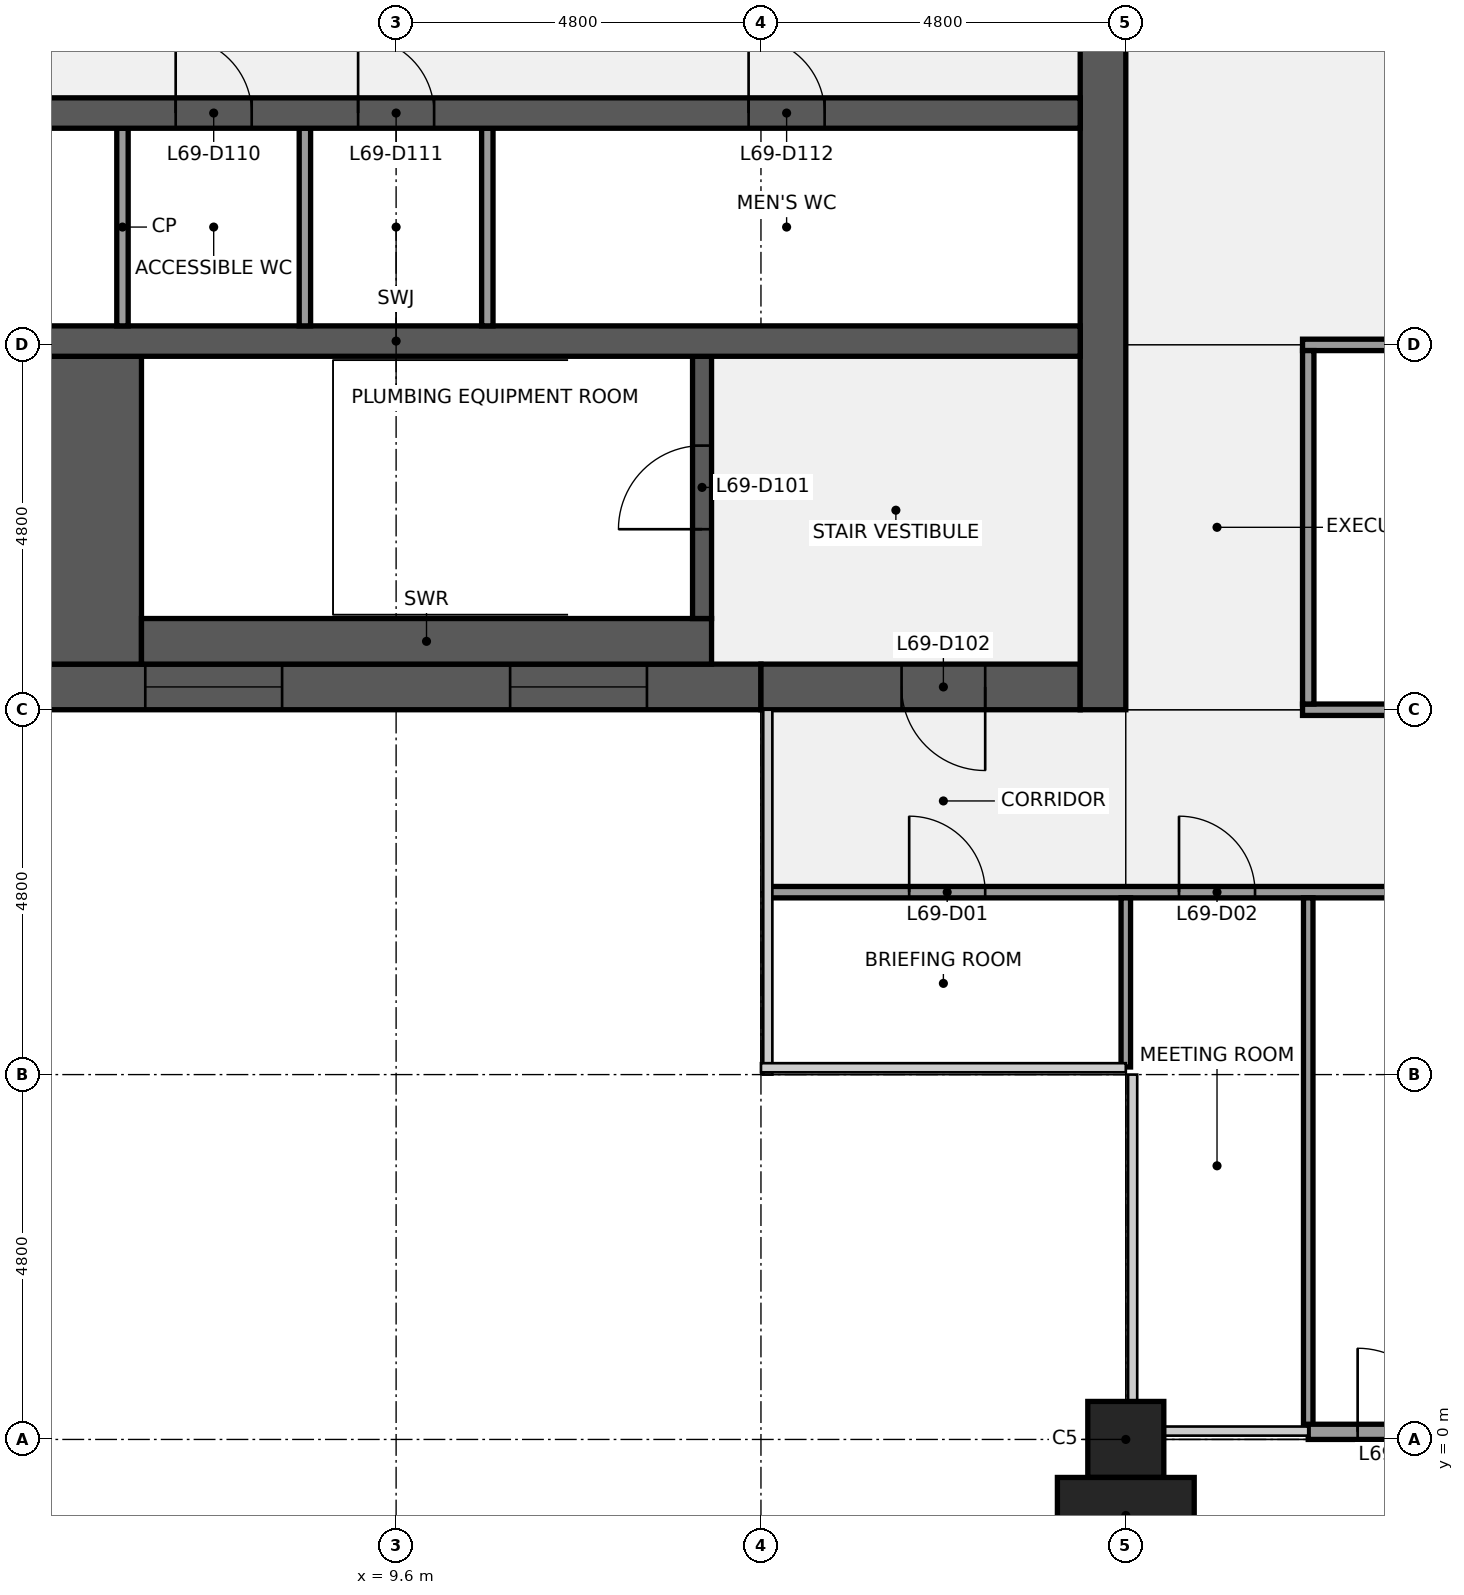
"""IFC4 building model, lengths in metres.
Left out: names, types, materials, properties, quantities, classifications, styles, units other than length and angle.
Written with IfcOpenShell. Run it as: python <this file> out.ifc"""

import sys

from ifc_helpers import new_model, si_unit, direction, frame, frame_2d, origin, origin_2d, place, context, subcontext, project, spatial, rectangle, extrude, element, fill, save


model = new_model("IFC4")
c1 = context("Model", 3, precision=1e-05, world=origin(), true_north=direction((0.0, 1.0)))
c2 = subcontext(c1, "Body", "Model", "MODEL_VIEW")
j1 = project(units=[si_unit("LENGTHUNIT", "METRE"), si_unit("PLANEANGLEUNIT", "RADIAN")], contexts=[c1])
p1 = place(None, origin())
s1 = spatial("IfcSite", under=j1, at=p1, CompositionType="ELEMENT")
p2 = place(p1, origin())
s2 = spatial("IfcBuilding", under=s1, at=p2, CompositionType="ELEMENT")
p3 = place(p2, frame((0.0, 0.0, 314.3)))
s3 = spatial("IfcBuildingStorey", under=s2, at=p3, CompositionType="ELEMENT", Elevation=314.3)
p4 = place(p3, frame((19.2, 0.0, 0.0), z_axis=(0.0, 0.0, 1.0), x_axis=(1.0, 0.0, 0.0)))
e1 = element("IfcColumn", 1, at=p4, inside=s3, PredefinedType="COLUMN", context=c2, shape_type="SweptSolid", body=[
    extrude(rectangle(XDim=1.0, YDim=1.0, at=origin_2d()), origin(), (0.0, 0.0, 1.0), 4.0),
])
p5 = place(p3, frame((14.4, 9.9, 0.0), z_axis=(0.0, 0.0, 1.0), x_axis=(-1.0, 0.0, 0.0)))
e2 = element("IfcWall", 2, at=p5, inside=s3, PredefinedType="SHEAR", context=c2, shape_type="SweptSolid", body=[
    extrude(rectangle(XDim=13.8, YDim=0.6, at=frame_2d((6.9, 0.0))), origin(), (0.0, 0.0, 1.0), 3.84),
])
p6 = place(p5, frame((6.3, 0.0, 0.9)))
e3 = element("IfcOpeningElement", 3, at=p6, cuts=e2, PredefinedType="OPENING", context=c2, shape_type="SweptSolid", body=[
    extrude(rectangle(XDim=1.8, YDim=1.5, at=frame_2d((0.9, 0.75))), frame((0.0, 0.31, 0.0), z_axis=(0.0, -1.0, 0.0), x_axis=(1.0, 0.0, 0.0)), (0.0, 0.0, 1.0), 0.62),
])
p7 = place(p5, frame((1.5, 0.0, 0.9)))
e4 = element("IfcOpeningElement", 4, at=p7, cuts=e2, PredefinedType="OPENING", context=c2, shape_type="SweptSolid", body=[
    extrude(rectangle(XDim=1.8, YDim=1.5, at=frame_2d((0.9, 0.75))), frame((0.0, 0.31, 0.0), z_axis=(0.0, -1.0, 0.0), x_axis=(1.0, 0.0, 0.0)), (0.0, 0.0, 1.0), 0.62),
])
p8 = place(p3, frame((18.6, 9.9, 0.0), z_axis=(0.0, 0.0, 1.0), x_axis=(-1.0, 0.0, 0.0)))
e5 = element("IfcWall", 5, at=p8, inside=s3, PredefinedType="SHEAR", context=c2, shape_type="SweptSolid", body=[
    extrude(rectangle(XDim=4.2, YDim=0.6, at=frame_2d((2.1, 0.0))), origin(), (0.0, 0.0, 1.0), 3.84),
])
p9 = place(p8, frame((1.25, 0.0, 0.0)))
e6 = element("IfcOpeningElement", 6, at=p9, cuts=e5, PredefinedType="OPENING", context=c2, shape_type="SweptSolid", body=[
    extrude(rectangle(XDim=1.1, YDim=2.1, at=frame_2d((0.55, 1.05))), frame((0.0, 0.31, 0.0), z_axis=(0.0, -1.0, 0.0), x_axis=(1.0, 0.0, 0.0)), (0.0, 0.0, 1.0), 0.62),
])
p10 = place(p3, frame((18.9, 38.4, 0.0), z_axis=(0.0, 0.0, 1.0), x_axis=(0.0, -1.0, 0.0)))
e7 = element("IfcWall", 7, at=p10, inside=s3, PredefinedType="SHEAR", context=c2, shape_type="SweptSolid", body=[
    extrude(rectangle(XDim=28.8, YDim=0.6, at=frame_2d((14.4, 0.0))), origin(), (0.0, 0.0, 1.0), 3.84),
])
p11 = place(p10, frame((18.3, 0.0, 0.0)))
e8 = element("IfcOpeningElement", 8, at=p11, cuts=e7, PredefinedType="OPENING", context=c2, shape_type="SweptSolid", body=[
    extrude(rectangle(XDim=1.8, YDim=2.1, at=frame_2d((0.9, 1.05))), frame((0.0, 0.31, 0.0), z_axis=(0.0, -1.0, 0.0), x_axis=(1.0, 0.0, 0.0)), (0.0, 0.0, 1.0), 0.62),
])
p12 = place(p10, frame((8.7, 0.0, 0.0)))
e9 = element("IfcOpeningElement", 9, at=p12, cuts=e7, PredefinedType="OPENING", context=c2, shape_type="SweptSolid", body=[
    extrude(rectangle(XDim=1.8, YDim=2.1, at=frame_2d((0.9, 1.05))), frame((0.0, 0.31, 0.0), z_axis=(0.0, -1.0, 0.0), x_axis=(1.0, 0.0, 0.0)), (0.0, 0.0, 1.0), 0.62),
])
p13 = place(p3, frame((0.6, 12.225, 0.0), z_axis=(0.0, 0.0, 1.0), x_axis=(1.0, 0.0, 0.0)))
e10 = element("IfcWall", 10, at=p13, inside=s3, PredefinedType="SHEAR", context=c2, shape_type="SweptSolid", body=[
    extrude(rectangle(XDim=5.65, YDim=4.05, at=frame_2d((2.825, 0.0))), origin(), (0.0, 0.0, 1.0), 3.84),
])
p14 = place(p3, frame((6.25, 10.5, 0.0), z_axis=(0.0, 0.0, 1.0), x_axis=(1.0, 0.0, 0.0)))
e11 = element("IfcWall", 11, at=p14, inside=s3, PredefinedType="SHEAR", context=c2, shape_type="SweptSolid", body=[
    extrude(rectangle(XDim=7.5, YDim=0.6, at=frame_2d((3.75, 0.0))), origin(), (0.0, 0.0, 1.0), 3.84),
])
p15 = place(p3, frame((13.625, 10.8, 0.0), z_axis=(0.0, 0.0, 1.0), x_axis=(0.0, 1.0, 0.0)))
e12 = element("IfcWall", 12, at=p15, inside=s3, PredefinedType="SHEAR", context=c2, shape_type="SweptSolid", body=[
    extrude(rectangle(XDim=3.45, YDim=0.25, at=frame_2d((1.725, 0.0))), origin(), (0.0, 0.0, 1.0), 3.84),
])
p16 = place(p15, frame((1.175, 0.0, 0.0)))
e13 = element("IfcOpeningElement", 13, at=p16, cuts=e12, PredefinedType="OPENING", context=c2, shape_type="SweptSolid", body=[
    extrude(rectangle(XDim=1.1, YDim=2.1, at=frame_2d((0.55, 1.05))), frame((0.0, 0.135, 0.0), z_axis=(0.0, -1.0, 0.0), x_axis=(1.0, 0.0, 0.0)), (0.0, 0.0, 1.0), 0.27),
])
p17 = place(p3, frame((0.6, 14.45, 0.0), z_axis=(0.0, 0.0, 1.0), x_axis=(1.0, 0.0, 0.0)))
e14 = element("IfcWall", 14, at=p17, inside=s3, PredefinedType="SHEAR", context=c2, shape_type="SweptSolid", body=[
    extrude(rectangle(XDim=18.0, YDim=0.4, at=frame_2d((9.0, 0.0))), origin(), (0.0, 0.0, 1.0), 3.84),
])
for number, where, z_axis, x_axis in (
    (15, (6.0, 14.65, 0.0), (0.0, 0.0, 1.0), (0.0, 1.0, 0.0)),
    (16, (8.4, 14.65, 0.0), (0.0, 0.0, 1.0), (0.0, 1.0, 0.0)),
    (17, (10.8, 14.65, 0.0), (0.0, 0.0, 1.0), (0.0, 1.0, 0.0)),
):
    element("IfcWall", number, at=place(p3, frame(where, z_axis=z_axis, x_axis=x_axis)), inside=s3, PredefinedType="PARTITIONING", context=c2, shape_type="SweptSolid", body=[
        extrude(rectangle(XDim=2.6, YDim=0.15, at=frame_2d((1.3, 0.0))), origin(), (0.0, 0.0, 1.0), 3.84),
    ])
p18 = place(p3, frame((0.6, 17.45, 0.0), z_axis=(0.0, 0.0, 1.0), x_axis=(1.0, 0.0, 0.0)))
e18 = element("IfcWall", 18, at=p18, inside=s3, PredefinedType="SHEAR", context=c2, shape_type="SweptSolid", body=[
    extrude(rectangle(XDim=18.0, YDim=0.4, at=frame_2d((9.0, 0.0))), origin(), (0.0, 0.0, 1.0), 3.84),
])
p19 = place(p18, frame((2.163, 0.0, 0.0)))
e19 = element("IfcOpeningElement", 19, at=p19, cuts=e18, PredefinedType="OPENING", context=c2, shape_type="SweptSolid", body=[
    extrude(rectangle(XDim=1.0, YDim=2.1, at=frame_2d((0.5, 1.05))), frame((0.0, 0.21, 0.0), z_axis=(0.0, -1.0, 0.0), x_axis=(1.0, 0.0, 0.0)), (0.0, 0.0, 1.0), 0.42),
])
p20 = place(p18, frame((6.1, 0.0, 0.0)))
e20 = element("IfcOpeningElement", 20, at=p20, cuts=e18, PredefinedType="OPENING", context=c2, shape_type="SweptSolid", body=[
    extrude(rectangle(XDim=1.0, YDim=2.1, at=frame_2d((0.5, 1.05))), frame((0.0, 0.21, 0.0), z_axis=(0.0, -1.0, 0.0), x_axis=(1.0, 0.0, 0.0)), (0.0, 0.0, 1.0), 0.42),
])
p21 = place(p18, frame((8.5, 0.0, 0.0)))
e21 = element("IfcOpeningElement", 21, at=p21, cuts=e18, PredefinedType="OPENING", context=c2, shape_type="SweptSolid", body=[
    extrude(rectangle(XDim=1.0, YDim=2.1, at=frame_2d((0.5, 1.05))), frame((0.0, 0.21, 0.0), z_axis=(0.0, -1.0, 0.0), x_axis=(1.0, 0.0, 0.0)), (0.0, 0.0, 1.0), 0.42),
])
p22 = place(p18, frame((13.637, 0.0, 0.0)))
e22 = element("IfcOpeningElement", 22, at=p22, cuts=e18, PredefinedType="OPENING", context=c2, shape_type="SweptSolid", body=[
    extrude(rectangle(XDim=1.0, YDim=2.1, at=frame_2d((0.5, 1.05))), frame((0.0, 0.21, 0.0), z_axis=(0.0, -1.0, 0.0), x_axis=(1.0, 0.0, 0.0)), (0.0, 0.0, 1.0), 0.42),
])
p23 = place(p3, frame((14.5, 7.2, 0.0), z_axis=(0.0, 0.0, 1.0), x_axis=(1.0, 0.0, 0.0)))
e23 = element("IfcWall", 23, at=p23, inside=s3, PredefinedType="PARTITIONING", context=c2, shape_type="SweptSolid", body=[
    extrude(rectangle(XDim=28.6, YDim=0.15, at=frame_2d((14.3, 0.0))), origin(), (0.0, 0.0, 1.0), 2.87),
])
p24 = place(p23, frame((1.85, 0.0, 0.0)))
e24 = element("IfcOpeningElement", 24, at=p24, cuts=e23, PredefinedType="OPENING", context=c2, shape_type="SweptSolid", body=[
    extrude(rectangle(XDim=1.0, YDim=2.1, at=frame_2d((0.5, 1.05))), frame((0.0, 0.085, 0.0), z_axis=(0.0, -1.0, 0.0), x_axis=(1.0, 0.0, 0.0)), (0.0, 0.0, 1.0), 0.17),
])
p25 = place(p23, frame((5.4, 0.0, 0.0)))
e25 = element("IfcOpeningElement", 25, at=p25, cuts=e23, PredefinedType="OPENING", context=c2, shape_type="SweptSolid", body=[
    extrude(rectangle(XDim=1.0, YDim=2.1, at=frame_2d((0.5, 1.05))), frame((0.0, 0.085, 0.0), z_axis=(0.0, -1.0, 0.0), x_axis=(1.0, 0.0, 0.0)), (0.0, 0.0, 1.0), 0.17),
])
p26 = place(p23, frame((9.0, 0.0, 0.0)))
e26 = element("IfcOpeningElement", 26, at=p26, cuts=e23, PredefinedType="OPENING", context=c2, shape_type="SweptSolid", body=[
    extrude(rectangle(XDim=1.0, YDim=2.1, at=frame_2d((0.5, 1.05))), frame((0.0, 0.085, 0.0), z_axis=(0.0, -1.0, 0.0), x_axis=(1.0, 0.0, 0.0)), (0.0, 0.0, 1.0), 0.17),
])
p27 = place(p23, frame((12.6, 0.0, 0.0)))
e27 = element("IfcOpeningElement", 27, at=p27, cuts=e23, PredefinedType="OPENING", context=c2, shape_type="SweptSolid", body=[
    extrude(rectangle(XDim=1.0, YDim=2.1, at=frame_2d((0.5, 1.05))), frame((0.0, 0.085, 0.0), z_axis=(0.0, -1.0, 0.0), x_axis=(1.0, 0.0, 0.0)), (0.0, 0.0, 1.0), 0.17),
])
p28 = place(p23, frame((18.6, 0.0, 0.0)))
e28 = element("IfcOpeningElement", 28, at=p28, cuts=e23, PredefinedType="OPENING", context=c2, shape_type="SweptSolid", body=[
    extrude(rectangle(XDim=1.0, YDim=2.1, at=frame_2d((0.5, 1.05))), frame((0.0, 0.085, 0.0), z_axis=(0.0, -1.0, 0.0), x_axis=(1.0, 0.0, 0.0)), (0.0, 0.0, 1.0), 0.17),
])
p29 = place(p23, frame((25.75, 0.0, 0.0)))
e29 = element("IfcOpeningElement", 29, at=p29, cuts=e23, PredefinedType="OPENING", context=c2, shape_type="SweptSolid", body=[
    extrude(rectangle(XDim=1.0, YDim=2.1, at=frame_2d((0.5, 1.05))), frame((0.0, 0.085, 0.0), z_axis=(0.0, -1.0, 0.0), x_axis=(1.0, 0.0, 0.0)), (0.0, 0.0, 1.0), 0.17),
])
p30 = place(p3, frame((21.525, 9.6, 0.0), z_axis=(0.0, 0.0, 1.0), x_axis=(1.0, 0.0, 0.0)))
e30 = element("IfcWall", 30, at=p30, inside=s3, PredefinedType="PARTITIONING", context=c2, shape_type="SweptSolid", body=[
    extrude(rectangle(XDim=14.55, YDim=0.15, at=frame_2d((7.275, 0.0))), origin(), (0.0, 0.0, 1.0), 2.87),
])
p31 = place(p30, frame((3.175, 0.0, 0.0)))
e31 = element("IfcOpeningElement", 31, at=p31, cuts=e30, PredefinedType="OPENING", context=c2, shape_type="SweptSolid", body=[
    extrude(rectangle(XDim=1.0, YDim=2.1, at=frame_2d((0.5, 1.05))), frame((0.0, 0.085, 0.0), z_axis=(0.0, -1.0, 0.0), x_axis=(1.0, 0.0, 0.0)), (0.0, 0.0, 1.0), 0.17),
])
p32 = place(p30, frame((10.375, 0.0, 0.0)))
e32 = element("IfcOpeningElement", 32, at=p32, cuts=e30, PredefinedType="OPENING", context=c2, shape_type="SweptSolid", body=[
    extrude(rectangle(XDim=1.0, YDim=2.1, at=frame_2d((0.5, 1.05))), frame((0.0, 0.085, 0.0), z_axis=(0.0, -1.0, 0.0), x_axis=(1.0, 0.0, 0.0)), (0.0, 0.0, 1.0), 0.17),
])
p33 = place(p3, frame((21.525, 14.4, 0.0), z_axis=(0.0, 0.0, 1.0), x_axis=(1.0, 0.0, 0.0)))
e33 = element("IfcWall", 33, at=p33, inside=s3, PredefinedType="PARTITIONING", context=c2, shape_type="SweptSolid", body=[
    extrude(rectangle(XDim=2.55, YDim=0.15, at=frame_2d((1.275, 0.0))), origin(), (0.0, 0.0, 1.0), 2.87),
])
p34 = place(p3, frame((19.2, 4.9, 0.0), z_axis=(0.0, 0.0, 1.0), x_axis=(0.0, 1.0, 0.0)))
e34 = element("IfcWall", 34, at=p34, inside=s3, PredefinedType="PARTITIONING", context=c2, shape_type="SweptSolid", body=[
    extrude(rectangle(XDim=2.225, YDim=0.125, at=frame_2d((1.113, 0.0))), origin(), (0.0, 0.0, 1.0), 2.87),
])
p35 = place(p3, frame((21.6, 0.1, 0.0), z_axis=(0.0, 0.0, 1.0), x_axis=(0.0, 1.0, 0.0)))
e35 = element("IfcWall", 35, at=p35, inside=s3, PredefinedType="PARTITIONING", context=c2, shape_type="SweptSolid", body=[
    extrude(rectangle(XDim=7.025, YDim=0.125, at=frame_2d((3.512, 0.0))), origin(), (0.0, 0.0, 1.0), 2.87),
])
p36 = place(p3, frame((21.6, 9.675, 0.0), z_axis=(0.0, 0.0, 1.0), x_axis=(0.0, 1.0, 0.0)))
e36 = element("IfcWall", 36, at=p36, inside=s3, PredefinedType="PARTITIONING", context=c2, shape_type="SweptSolid", body=[
    extrude(rectangle(XDim=4.65, YDim=0.15, at=frame_2d((2.325, 0.0))), origin(), (0.0, 0.0, 1.0), 2.87),
])
p37 = place(p3, frame((21.6, 0.1, 0.0), z_axis=(0.0, 0.0, 1.0), x_axis=(1.0, 0.0, 0.0)))
e37 = element("IfcWall", 37, at=p37, inside=s3, PredefinedType="SOLIDWALL", context=c2, shape_type="SweptSolid", body=[
    extrude(rectangle(XDim=2.4, YDim=0.2, at=frame_2d((1.2, 0.0))), origin(), (0.0, 0.0, 1.0), 3.314),
])
p38 = place(p37, frame((0.65, 0.0, 0.0)))
e38 = element("IfcOpeningElement", 38, at=p38, cuts=e37, PredefinedType="OPENING", context=c2, shape_type="SweptSolid", body=[
    extrude(rectangle(XDim=1.1, YDim=2.1, at=frame_2d((0.55, 1.05))), frame((0.0, 0.11, 0.0), z_axis=(0.0, -1.0, 0.0), x_axis=(1.0, 0.0, 0.0)), (0.0, 0.0, 1.0), 0.22),
])
p39 = place(p3, frame((19.2, -1.0, 0.0), z_axis=(0.0, 0.0, 1.0), x_axis=(1.0, 0.0, 0.0)))
e39 = element("IfcColumn", 39, at=p39, inside=s3, PredefinedType="PILASTER", context=c2, shape_type="SweptSolid", body=[
    extrude(rectangle(XDim=1.8, YDim=1.0, at=origin_2d()), origin(), (0.0, 0.0, 1.0), 4.0),
])
p40 = place(p16, origin())
e40 = element("IfcDoor", 40, at=p40, inside=s3, OperationType="SINGLE_SWING_LEFT", PredefinedType="DOOR", context=c2, shape_type="SweptSolid", body=[
    extrude(rectangle(XDim=1.1, YDim=2.1, at=frame_2d((0.55, 1.05))), frame((0.0, 0.025, 0.0), z_axis=(0.0, -1.0, 0.0), x_axis=(1.0, 0.0, 0.0)), (0.0, 0.0, 1.0), 0.05),
])
fill(e13, e40)
p41 = place(p9, origin())
e41 = element("IfcDoor", 41, at=p41, inside=s3, OperationType="SINGLE_SWING_LEFT", PredefinedType="DOOR", context=c2, shape_type="SweptSolid", body=[
    extrude(rectangle(XDim=1.1, YDim=2.1, at=frame_2d((0.55, 1.05))), frame((0.0, 0.025, 0.0), z_axis=(0.0, -1.0, 0.0), x_axis=(1.0, 0.0, 0.0)), (0.0, 0.0, 1.0), 0.05),
])
fill(e6, e41)
p42 = place(p20, origin())
e42 = element("IfcDoor", 42, at=p42, inside=s3, OperationType="SINGLE_SWING_LEFT", PredefinedType="DOOR", context=c2, shape_type="SweptSolid", body=[
    extrude(rectangle(XDim=1.0, YDim=2.1, at=frame_2d((0.5, 1.05))), frame((0.0, 0.025, 0.0), z_axis=(0.0, -1.0, 0.0), x_axis=(1.0, 0.0, 0.0)), (0.0, 0.0, 1.0), 0.05),
])
fill(e20, e42)
p43 = place(p21, origin())
e43 = element("IfcDoor", 43, at=p43, inside=s3, OperationType="SINGLE_SWING_LEFT", PredefinedType="DOOR", context=c2, shape_type="SweptSolid", body=[
    extrude(rectangle(XDim=1.0, YDim=2.1, at=frame_2d((0.5, 1.05))), frame((0.0, 0.025, 0.0), z_axis=(0.0, -1.0, 0.0), x_axis=(1.0, 0.0, 0.0)), (0.0, 0.0, 1.0), 0.05),
])
fill(e21, e43)
p44 = place(p22, origin())
e44 = element("IfcDoor", 44, at=p44, inside=s3, OperationType="SINGLE_SWING_LEFT", PredefinedType="DOOR", context=c2, shape_type="SweptSolid", body=[
    extrude(rectangle(XDim=1.0, YDim=2.1, at=frame_2d((0.5, 1.05))), frame((0.0, 0.025, 0.0), z_axis=(0.0, -1.0, 0.0), x_axis=(1.0, 0.0, 0.0)), (0.0, 0.0, 1.0), 0.05),
])
fill(e22, e44)
p45 = place(p6, origin())
e45 = element("IfcWindow", 45, at=p45, inside=s3, PartitioningType="SINGLE_PANEL", PredefinedType="WINDOW", context=c2, shape_type="SweptSolid", body=[
    extrude(rectangle(XDim=1.8, YDim=1.5, at=frame_2d((0.9, 0.75))), frame((0.0, 0.03, 0.0), z_axis=(0.0, -1.0, 0.0), x_axis=(1.0, 0.0, 0.0)), (0.0, 0.0, 1.0), 0.06),
])
fill(e3, e45)
p46 = place(p7, origin())
e46 = element("IfcWindow", 46, at=p46, inside=s3, PartitioningType="SINGLE_PANEL", PredefinedType="WINDOW", context=c2, shape_type="SweptSolid", body=[
    extrude(rectangle(XDim=1.8, YDim=1.5, at=frame_2d((0.9, 0.75))), frame((0.0, 0.03, 0.0), z_axis=(0.0, -1.0, 0.0), x_axis=(1.0, 0.0, 0.0)), (0.0, 0.0, 1.0), 0.06),
])
fill(e4, e46)
p47 = place(p24, origin())
e47 = element("IfcDoor", 47, at=p47, inside=s3, OperationType="SINGLE_SWING_LEFT", PredefinedType="DOOR", context=c2, shape_type="SweptSolid", body=[
    extrude(rectangle(XDim=1.0, YDim=2.1, at=frame_2d((0.5, 1.05))), frame((0.0, 0.025, 0.0), z_axis=(0.0, -1.0, 0.0), x_axis=(1.0, 0.0, 0.0)), (0.0, 0.0, 1.0), 0.05),
])
fill(e24, e47)
p48 = place(p25, origin())
e48 = element("IfcDoor", 48, at=p48, inside=s3, OperationType="SINGLE_SWING_LEFT", PredefinedType="DOOR", context=c2, shape_type="SweptSolid", body=[
    extrude(rectangle(XDim=1.0, YDim=2.1, at=frame_2d((0.5, 1.05))), frame((0.0, 0.025, 0.0), z_axis=(0.0, -1.0, 0.0), x_axis=(1.0, 0.0, 0.0)), (0.0, 0.0, 1.0), 0.05),
])
fill(e25, e48)
p49 = place(p38, origin())
e49 = element("IfcDoor", 49, at=p49, inside=s3, OperationType="SINGLE_SWING_LEFT", PredefinedType="DOOR", context=c2, shape_type="SweptSolid", body=[
    extrude(rectangle(XDim=1.1, YDim=2.1, at=frame_2d((0.55, 1.05))), frame((0.0, 0.025, 0.0), z_axis=(0.0, -1.0, 0.0), x_axis=(1.0, 0.0, 0.0)), (0.0, 0.0, 1.0), 0.05),
])
fill(e38, e49)
save(model, sys.argv[1])
